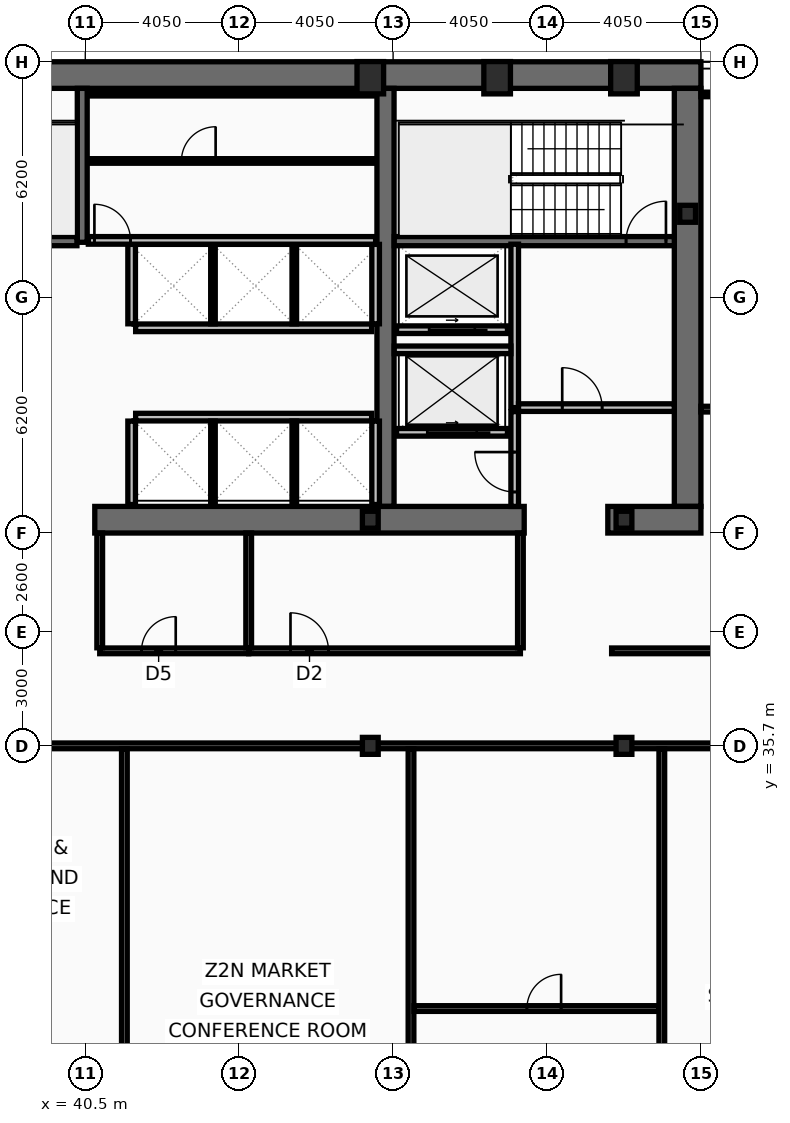
"""IFC4 building model, lengths in metres.
Left out: names, types, materials, properties, quantities, classifications, styles, units other than length and angle.
Written with IfcOpenShell. Run it as: python <this file> out.ifc"""

import sys

from ifc_helpers import new_model, si_unit, direction, frame, frame_2d, origin, origin_2d, place, context, subcontext, project, spatial, rectangle, hollow_rectangle, i_section, extrude, element, fill, save


model = new_model("IFC4")
c1 = context("Model", 3, precision=1e-05, world=origin(), true_north=direction((0.0, 1.0)))
c2 = subcontext(c1, "Body", "Model", "MODEL_VIEW")
j1 = project(units=[si_unit("LENGTHUNIT", "METRE"), si_unit("PLANEANGLEUNIT", "RADIAN")], contexts=[c1])
p1 = place(None, origin())
s1 = spatial("IfcSite", under=j1, at=p1, CompositionType="ELEMENT")
p2 = place(p1, origin())
s2 = spatial("IfcBuilding", under=s1, at=p2, CompositionType="ELEMENT")
p3 = place(p2, frame((0.0, 0.0, 114.6)))
s3 = spatial("IfcBuildingStorey", under=s2, at=p3, CompositionType="ELEMENT", Elevation=114.6)
p4 = place(p3, frame((16.2, 53.35, 0.0), z_axis=(0.0, 0.0, 1.0), x_axis=(1.0, 0.0, 0.0)))
e1 = element("IfcWall", 1, at=p4, inside=s3, PredefinedType="SHEAR", context=c2, shape_type="SweptSolid", body=[
    extrude(rectangle(XDim=40.5, YDim=0.7, at=frame_2d((20.25, 0.0))), origin(), (0.0, 0.0, 1.0), 3.44),
])
p5 = place(p3, frame((56.35, 53.0, 0.0), z_axis=(0.0, 0.0, 1.0), x_axis=(0.0, -1.0, 0.0)))
e2 = element("IfcWall", 2, at=p5, inside=s3, PredefinedType="SHEAR", context=c2, shape_type="SweptSolid", body=[
    extrude(rectangle(XDim=11.0, YDim=0.7, at=frame_2d((5.5, 0.0))), origin(), (0.0, 0.0, 1.0), 3.44),
])
p6 = place(p3, frame((48.4, 42.0, 0.0), z_axis=(0.0, 0.0, 1.0), x_axis=(0.0, 1.0, 0.0)))
e3 = element("IfcWall", 3, at=p6, inside=s3, PredefinedType="SHEAR", context=c2, shape_type="SweptSolid", body=[
    extrude(rectangle(XDim=11.0, YDim=0.45, at=frame_2d((5.5, 0.0))), origin(), (0.0, 0.0, 1.0), 3.44),
])
p7 = place(p3, frame((52.05, 41.65, 0.0), z_axis=(0.0, 0.0, 1.0), x_axis=(-1.0, 0.0, 0.0)))
e4 = element("IfcWall", 4, at=p7, inside=s3, PredefinedType="SHEAR", context=c2, shape_type="SweptSolid", body=[
    extrude(rectangle(XDim=11.3, YDim=0.7, at=frame_2d((5.65, 0.0))), origin(), (0.0, 0.0, 1.0), 3.44),
])
p8 = place(p3, frame((56.7, 41.65, 0.0), z_axis=(0.0, 0.0, 1.0), x_axis=(-1.0, 0.0, 0.0)))
e5 = element("IfcWall", 5, at=p8, inside=s3, PredefinedType="SHEAR", context=c2, shape_type="SweptSolid", body=[
    extrude(rectangle(XDim=2.45, YDim=0.7, at=frame_2d((1.225, 0.0))), origin(), (0.0, 0.0, 1.0), 3.44),
])
p9 = place(p3, frame((40.42, 48.95, 0.0), z_axis=(0.0, 0.0, 1.0), x_axis=(0.0, 1.0, 0.0)))
e6 = element("IfcWall", 6, at=p9, inside=s3, PredefinedType="SHEAR", context=c2, shape_type="SweptSolid", body=[
    extrude(rectangle(XDim=4.05, YDim=0.26, at=frame_2d((2.025, 0.0))), origin(), (0.0, 0.0, 1.0), 3.44),
])
p10 = place(p3, frame((48.63, 48.98, 0.0), z_axis=(0.0, 0.0, 1.0), x_axis=(1.0, 0.0, 0.0)))
e7 = element("IfcWall", 7, at=p10, inside=s3, PredefinedType="SHEAR", context=c2, shape_type="SweptSolid", body=[
    extrude(rectangle(XDim=7.37, YDim=0.24, at=frame_2d((3.685, 0.0))), origin(), (0.0, 0.0, 1.0), 3.44),
])
p11 = place(p10, frame((6.1, 0.0, 0.0)))
e8 = element("IfcOpeningElement", 8, at=p11, cuts=e7, PredefinedType="OPENING", context=c2, shape_type="SweptSolid", body=[
    extrude(rectangle(XDim=1.05, YDim=2.15, at=frame_2d((0.525, 1.075))), frame((0.0, 0.13, 0.0), z_axis=(0.0, -1.0, 0.0), x_axis=(1.0, 0.0, 0.0)), (0.0, 0.0, 1.0), 0.26),
])
p12 = place(p3, frame((32.72, 48.98, 0.0), z_axis=(0.0, 0.0, 1.0), x_axis=(1.0, 0.0, 0.0)))
e9 = element("IfcWall", 9, at=p12, inside=s3, PredefinedType="SHEAR", context=c2, shape_type="SweptSolid", body=[
    extrude(rectangle(XDim=7.56, YDim=0.24, at=frame_2d((3.78, 0.0))), origin(), (0.0, 0.0, 1.0), 3.44),
])
p13 = place(p12, frame((0.22, 0.0, 0.0)))
e10 = element("IfcOpeningElement", 10, at=p13, cuts=e9, PredefinedType="OPENING", context=c2, shape_type="SweptSolid", body=[
    extrude(rectangle(XDim=1.05, YDim=2.15, at=frame_2d((0.525, 1.075))), frame((0.0, 0.13, 0.0), z_axis=(0.0, -1.0, 0.0), x_axis=(1.0, 0.0, 0.0)), (0.0, 0.0, 1.0), 0.26),
])
for number, where, z_axis, x_axis in (
    (11, (48.0, 53.28, 0.0), (0.0, 0.0, 1.0), (1.0, 0.0, 0.0)),
    (12, (51.337, 53.28, 0.0), (0.0, 0.0, 1.0), (1.0, 0.0, 0.0)),
    (13, (54.675, 53.28, 0.0), (0.0, 0.0, 1.0), (1.0, 0.0, 0.0)),
):
    element("IfcColumn", number, at=place(p3, frame(where, z_axis=z_axis, x_axis=x_axis)), inside=s3, PredefinedType="COLUMN", context=c2, shape_type="SweptSolid", body=[
        extrude(hollow_rectangle(XDim=0.7, YDim=0.85, WallThickness=0.05, at=origin_2d()), origin(), (0.0, 0.0, 1.0), 3.6),
    ])
for number, where, z_axis, x_axis in (
    (14, (56.35, 49.7, 0.0), (0.0, 0.0, 1.0), (1.0, 0.0, 0.0)),
    (15, (48.0, 35.7, 0.0), (0.0, 0.0, 1.0), (1.0, 0.0, 0.0)),
    (16, (48.0, 41.65, 0.0), (0.0, 0.0, 1.0), (1.0, 0.0, 0.0)),
    (17, (54.675, 35.7, 0.0), (0.0, 0.0, 1.0), (1.0, 0.0, 0.0)),
    (18, (54.675, 41.65, 0.0), (0.0, 0.0, 1.0), (1.0, 0.0, 0.0)),
):
    element("IfcColumn", number, at=place(p3, frame(where, z_axis=z_axis, x_axis=x_axis)), inside=s3, PredefinedType="COLUMN", context=c2, shape_type="SweptSolid", body=[
        extrude(i_section(OverallWidth=0.416, OverallDepth=0.446, WebThickness=0.039, FlangeThickness=0.063, at=origin_2d()), origin(), (0.0, 0.0, 1.0), 3.6),
    ])
p14 = place(p3, frame((51.61, 43.95, 0.0), z_axis=(0.0, 0.0, 1.0), x_axis=(-1.0, 0.0, 0.0)))
e19 = element("IfcWall", 19, at=p14, inside=s3, PredefinedType="PARTITIONING", context=c2, shape_type="SweptSolid", body=[
    extrude(rectangle(XDim=2.92, YDim=0.2, at=frame_2d((1.46, 0.0))), origin(), (0.0, 0.0, 1.0), 3.44),
])
p15 = place(p14, frame((0.81, 0.0, 0.0)))
e20 = element("IfcOpeningElement", 20, at=p15, cuts=e19, PredefinedType="OPENING", context=c2, shape_type="SweptSolid", body=[
    extrude(rectangle(XDim=1.3, YDim=2.18, at=frame_2d((0.65, 1.09))), frame((0.0, 0.11, 0.0), z_axis=(0.0, -1.0, 0.0), x_axis=(1.0, 0.0, 0.0)), (0.0, 0.0, 1.0), 0.22),
])
p16 = place(p3, frame((51.61, 46.65, 0.0), z_axis=(0.0, 0.0, 1.0), x_axis=(-1.0, 0.0, 0.0)))
e21 = element("IfcWall", 21, at=p16, inside=s3, PredefinedType="PARTITIONING", context=c2, shape_type="SweptSolid", body=[
    extrude(rectangle(XDim=2.92, YDim=0.2, at=frame_2d((1.46, 0.0))), origin(), (0.0, 0.0, 1.0), 3.44),
])
p17 = place(p16, frame((0.86, 0.0, 0.0)))
e22 = element("IfcOpeningElement", 22, at=p17, cuts=e21, PredefinedType="OPENING", context=c2, shape_type="SweptSolid", body=[
    extrude(rectangle(XDim=1.2, YDim=2.18, at=frame_2d((0.6, 1.09))), frame((0.0, 0.11, 0.0), z_axis=(0.0, -1.0, 0.0), x_axis=(1.0, 0.0, 0.0)), (0.0, 0.0, 1.0), 0.22),
])
p18 = place(p3, frame((51.8, 44.6, 0.0), z_axis=(0.0, 0.0, 1.0), x_axis=(0.0, 1.0, 0.0)))
e23 = element("IfcWall", 23, at=p18, inside=s3, PredefinedType="PARTITIONING", context=c2, shape_type="SweptSolid", body=[
    extrude(rectangle(XDim=4.3, YDim=0.2, at=frame_2d((2.15, 0.0))), origin(), (0.0, 0.0, 1.0), 3.44),
])
p19 = place(p3, frame((51.9, 44.6, 0.0), z_axis=(0.0, 0.0, 1.0), x_axis=(1.0, 0.0, 0.0)))
e24 = element("IfcWall", 24, at=p19, inside=s3, PredefinedType="PARTITIONING", context=c2, shape_type="SweptSolid", body=[
    extrude(rectangle(XDim=4.1, YDim=0.2, at=frame_2d((2.05, 0.0))), origin(), (0.0, 0.0, 1.0), 3.44),
])
p20 = place(p19, frame((1.15, 0.0, 0.0)))
e25 = element("IfcOpeningElement", 25, at=p20, cuts=e24, PredefinedType="OPENING", context=c2, shape_type="SweptSolid", body=[
    extrude(rectangle(XDim=1.05, YDim=2.15, at=frame_2d((0.525, 1.075))), frame((0.0, 0.11, 0.0), z_axis=(0.0, -1.0, 0.0), x_axis=(1.0, 0.0, 0.0)), (0.0, 0.0, 1.0), 0.22),
])
p21 = place(p3, frame((48.63, 46.12, 0.0), z_axis=(0.0, 0.0, 1.0), x_axis=(1.0, 0.0, 0.0)))
e26 = element("IfcWall", 26, at=p21, inside=s3, PredefinedType="PARTITIONING", context=c2, shape_type="SweptSolid", body=[
    extrude(rectangle(XDim=3.07, YDim=0.2, at=frame_2d((1.535, 0.0))), origin(), (0.0, 0.0, 1.0), 3.44),
])
p22 = place(p3, frame((51.8, 42.0, 0.0), z_axis=(0.0, 0.0, 1.0), x_axis=(0.0, 1.0, 0.0)))
e27 = element("IfcWall", 27, at=p22, inside=s3, PredefinedType="PARTITIONING", context=c2, shape_type="SweptSolid", body=[
    extrude(rectangle(XDim=2.495, YDim=0.2, at=frame_2d((1.248, 0.0))), origin(), (0.0, 0.0, 1.0), 3.44),
])
p23 = place(p22, frame((0.38, 0.0, 0.0)))
e28 = element("IfcOpeningElement", 28, at=p23, cuts=e27, PredefinedType="OPENING", context=c2, shape_type="SweptSolid", body=[
    extrude(rectangle(XDim=1.05, YDim=2.15, at=frame_2d((0.525, 1.075))), frame((0.0, 0.11, 0.0), z_axis=(0.0, -1.0, 0.0), x_axis=(1.0, 0.0, 0.0)), (0.0, 0.0, 1.0), 0.22),
])
p24 = place(p3, frame((41.825, 46.7, 0.0), z_axis=(0.0, 0.0, 1.0), x_axis=(1.0, 0.0, 0.0)))
e29 = element("IfcWall", 29, at=p24, inside=s3, PredefinedType="PARTITIONING", context=c2, shape_type="SweptSolid", body=[
    extrude(rectangle(XDim=6.21, YDim=0.2, at=frame_2d((3.105, 0.0))), origin(), (0.0, 0.0, 1.0), 3.44),
])
for number, where, z_axis, x_axis in (
    (30, (41.72, 46.805, 0.0), (0.0, 0.0, 1.0), (0.0, 1.0, 0.0)),
    (31, (48.14, 46.805, 0.0), (0.0, 0.0, 1.0), (0.0, 1.0, 0.0)),
):
    element("IfcWall", number, at=place(p3, frame(where, z_axis=z_axis, x_axis=x_axis)), inside=s3, PredefinedType="PARTITIONING", context=c2, shape_type="SweptSolid", body=[
        extrude(rectangle(XDim=2.09, YDim=0.2, at=frame_2d((1.045, 0.0))), origin(), (0.0, 0.0, 1.0), 3.44),
    ])
for number, where, z_axis, x_axis in (
    (32, (43.86, 46.805, 0.0), (0.0, 0.0, 1.0), (0.0, 1.0, 0.0)),
    (33, (46.0, 46.805, 0.0), (0.0, 0.0, 1.0), (0.0, 1.0, 0.0)),
):
    element("IfcWall", number, at=place(p3, frame(where, z_axis=z_axis, x_axis=x_axis)), inside=s3, PredefinedType="PARTITIONING", context=c2, shape_type="SweptSolid", body=[
        extrude(rectangle(XDim=2.09, YDim=0.12, at=frame_2d((1.045, 0.0))), origin(), (0.0, 0.0, 1.0), 3.44),
    ])
p25 = place(p3, frame((41.825, 44.35, 0.0), z_axis=(0.0, 0.0, 1.0), x_axis=(1.0, 0.0, 0.0)))
e34 = element("IfcWall", 34, at=p25, inside=s3, PredefinedType="PARTITIONING", context=c2, shape_type="SweptSolid", body=[
    extrude(rectangle(XDim=6.21, YDim=0.2, at=frame_2d((3.105, 0.0))), origin(), (0.0, 0.0, 1.0), 3.44),
])
for number, where, z_axis, x_axis in (
    (35, (41.72, 42.05, 0.0), (0.0, 0.0, 1.0), (0.0, 1.0, 0.0)),
    (36, (48.14, 42.05, 0.0), (0.0, 0.0, 1.0), (0.0, 1.0, 0.0)),
):
    element("IfcWall", number, at=place(p3, frame(where, z_axis=z_axis, x_axis=x_axis)), inside=s3, PredefinedType="PARTITIONING", context=c2, shape_type="SweptSolid", body=[
        extrude(rectangle(XDim=2.195, YDim=0.2, at=frame_2d((1.098, 0.0))), origin(), (0.0, 0.0, 1.0), 3.44),
    ])
for number, where, z_axis, x_axis in (
    (37, (43.86, 42.05, 0.0), (0.0, 0.0, 1.0), (0.0, 1.0, 0.0)),
    (38, (46.0, 42.05, 0.0), (0.0, 0.0, 1.0), (0.0, 1.0, 0.0)),
):
    element("IfcWall", number, at=place(p3, frame(where, z_axis=z_axis, x_axis=x_axis)), inside=s3, PredefinedType="PARTITIONING", context=c2, shape_type="SweptSolid", body=[
        extrude(rectangle(XDim=2.195, YDim=0.12, at=frame_2d((1.098, 0.0))), origin(), (0.0, 0.0, 1.0), 3.44),
    ])
p26 = place(p3, frame((40.58, 52.86, 0.0), z_axis=(0.0, 0.0, 1.0), x_axis=(1.0, 0.0, 0.0)))
e39 = element("IfcWall", 39, at=p26, inside=s3, PredefinedType="PARTITIONING", context=c2, shape_type="SweptSolid", body=[
    extrude(rectangle(XDim=7.56, YDim=0.12, at=frame_2d((3.78, 0.0))), origin(), (0.0, 0.0, 1.0), 3.44),
])
p27 = place(p3, frame((40.58, 49.0, 0.0), z_axis=(0.0, 0.0, 1.0), x_axis=(1.0, 0.0, 0.0)))
e40 = element("IfcWall", 40, at=p27, inside=s3, PredefinedType="PARTITIONING", context=c2, shape_type="SweptSolid", body=[
    extrude(rectangle(XDim=7.56, YDim=0.2, at=frame_2d((3.78, 0.0))), origin(), (0.0, 0.0, 1.0), 3.44),
])
p28 = place(p27, frame((0.16, 0.0, 0.0)))
e41 = element("IfcOpeningElement", 41, at=p28, cuts=e40, PredefinedType="OPENING", context=c2, shape_type="SweptSolid", body=[
    extrude(rectangle(XDim=0.95, YDim=2.1, at=frame_2d((0.475, 1.05))), frame((0.0, 0.11, 0.0), z_axis=(0.0, -1.0, 0.0), x_axis=(1.0, 0.0, 0.0)), (0.0, 0.0, 1.0), 0.22),
])
p29 = place(p3, frame((40.63, 51.09, 0.0), z_axis=(0.0, 0.0, 1.0), x_axis=(1.0, 0.0, 0.0)))
e42 = element("IfcWall", 42, at=p29, inside=s3, PredefinedType="PARTITIONING", context=c2, shape_type="SweptSolid", body=[
    extrude(rectangle(XDim=7.46, YDim=0.12, at=frame_2d((3.73, 0.0))), origin(), (0.0, 0.0, 1.0), 3.44),
])
p30 = place(p29, frame((2.4, 0.0, 0.0)))
e43 = element("IfcOpeningElement", 43, at=p30, cuts=e42, PredefinedType="OPENING", context=c2, shape_type="SweptSolid", body=[
    extrude(rectangle(XDim=0.9, YDim=2.05, at=frame_2d((0.45, 1.025))), frame((0.0, 0.07, 0.0), z_axis=(0.0, -1.0, 0.0), x_axis=(1.0, 0.0, 0.0)), (0.0, 0.0, 1.0), 0.14),
])
p31 = place(p3, frame((40.88, 38.2, 0.0), z_axis=(0.0, 0.0, 1.0), x_axis=(1.0, 0.0, 0.0)))
e44 = element("IfcWall", 44, at=p31, inside=s3, PredefinedType="PARTITIONING", context=c2, shape_type="SweptSolid", body=[
    extrude(rectangle(XDim=3.92, YDim=0.15, at=frame_2d((1.96, 0.0))), origin(), (0.0, 0.0, 1.0), 2.73),
])
p32 = place(p31, frame((1.1, 0.0, 0.0)))
e45 = element("IfcOpeningElement", 45, at=p32, cuts=e44, PredefinedType="OPENING", context=c2, shape_type="SweptSolid", body=[
    extrude(rectangle(XDim=0.9, YDim=2.05, at=frame_2d((0.45, 1.025))), frame((0.0, 0.085, 0.0), z_axis=(0.0, -1.0, 0.0), x_axis=(1.0, 0.0, 0.0)), (0.0, 0.0, 1.0), 0.17),
])
p33 = place(p3, frame((44.8, 38.2, 0.0), z_axis=(0.0, 0.0, 1.0), x_axis=(1.0, 0.0, 0.0)))
e46 = element("IfcWall", 46, at=p33, inside=s3, PredefinedType="PARTITIONING", context=c2, shape_type="SweptSolid", body=[
    extrude(rectangle(XDim=7.15, YDim=0.15, at=frame_2d((3.575, 0.0))), origin(), (0.0, 0.0, 1.0), 2.73),
])
p34 = place(p33, frame((1.1, 0.0, 0.0)))
e47 = element("IfcOpeningElement", 47, at=p34, cuts=e46, PredefinedType="OPENING", context=c2, shape_type="SweptSolid", body=[
    extrude(rectangle(XDim=1.0, YDim=2.05, at=frame_2d((0.5, 1.025))), frame((0.0, 0.085, 0.0), z_axis=(0.0, -1.0, 0.0), x_axis=(1.0, 0.0, 0.0)), (0.0, 0.0, 1.0), 0.17),
])
for number, where, z_axis, x_axis in (
    (48, (40.88, 38.28, 0.0), (0.0, 0.0, 1.0), (0.0, 1.0, 0.0)),
    (49, (44.8, 38.28, 0.0), (0.0, 0.0, 1.0), (0.0, 1.0, 0.0)),
    (50, (51.95, 38.28, 0.0), (0.0, 0.0, 1.0), (0.0, 1.0, 0.0)),
):
    element("IfcWall", number, at=place(p3, frame(where, z_axis=z_axis, x_axis=x_axis)), inside=s3, PredefinedType="PARTITIONING", context=c2, shape_type="SweptSolid", body=[
        extrude(rectangle(XDim=3.02, YDim=0.15, at=frame_2d((1.51, 0.0))), origin(), (0.0, 0.0, 1.0), 3.44),
    ])
p35 = place(p3, frame((54.35, 38.2, 0.0), z_axis=(0.0, 0.0, 1.0), x_axis=(1.0, 0.0, 0.0)))
e51 = element("IfcWall", 51, at=p35, inside=s3, PredefinedType="PARTITIONING", context=c2, shape_type="SweptSolid", body=[
    extrude(rectangle(XDim=14.52, YDim=0.15, at=frame_2d((7.26, 0.0))), origin(), (0.0, 0.0, 1.0), 2.73),
])
p36 = place(p35, frame((3.25, 0.0, 0.0)))
e52 = element("IfcOpeningElement", 52, at=p36, cuts=e51, PredefinedType="OPENING", context=c2, shape_type="SweptSolid", body=[
    extrude(rectangle(XDim=0.95, YDim=2.05, at=frame_2d((0.475, 1.025))), frame((0.0, 0.085, 0.0), z_axis=(0.0, -1.0, 0.0), x_axis=(1.0, 0.0, 0.0)), (0.0, 0.0, 1.0), 0.17),
])
p37 = place(p3, frame((56.7, 44.56, 0.0), z_axis=(0.0, 0.0, 1.0), x_axis=(1.0, 0.0, 0.0)))
e53 = element("IfcWall", 53, at=p37, inside=s3, PredefinedType="PARTITIONING", context=c2, shape_type="SweptSolid", body=[
    extrude(rectangle(XDim=12.105, YDim=0.15, at=frame_2d((6.052, 0.0))), origin(), (0.0, 0.0, 1.0), 2.83),
])
p38 = place(p37, frame((0.9, 0.0, 0.0)))
e54 = element("IfcOpeningElement", 54, at=p38, cuts=e53, PredefinedType="OPENING", context=c2, shape_type="SweptSolid", body=[
    extrude(rectangle(XDim=0.9, YDim=2.05, at=frame_2d((0.45, 1.025))), frame((0.0, 0.085, 0.0), z_axis=(0.0, -1.0, 0.0), x_axis=(1.0, 0.0, 0.0)), (0.0, 0.0, 1.0), 0.17),
])
p39 = place(p3, frame((21.81, 35.7, 0.0), z_axis=(0.0, 0.0, 1.0), x_axis=(1.0, 0.0, 0.0)))
e55 = element("IfcWall", 55, at=p39, inside=s3, PredefinedType="PARTITIONING", context=c2, shape_type="SweptSolid", body=[
    extrude(rectangle(XDim=46.995, YDim=0.15, at=frame_2d((23.498, 0.0))), origin(), (0.0, 0.0, 1.0), 2.73),
])
for number, where, z_axis, x_axis in (
    (56, (41.529, 21.385, 0.0), (0.0, 0.0, 1.0), (0.0, 1.0, 0.0)),
    (57, (49.071, 21.385, 0.0), (0.0, 0.0, 1.0), (0.0, 1.0, 0.0)),
):
    element("IfcWall", number, at=place(p3, frame(where, z_axis=z_axis, x_axis=x_axis)), inside=s3, PredefinedType="PARTITIONING", context=c2, shape_type="SweptSolid", body=[
        extrude(rectangle(XDim=14.235, YDim=0.15, at=frame_2d((7.118, 0.0))), origin(), (0.0, 0.0, 1.0), 2.88),
    ])
p40 = place(p3, frame((49.151, 28.788, 0.0), z_axis=(0.0, 0.0, 1.0), x_axis=(1.0, 0.0, 0.0)))
e58 = element("IfcWall", 58, at=p40, inside=s3, PredefinedType="PARTITIONING", context=c2, shape_type="SweptSolid", body=[
    extrude(rectangle(XDim=6.44, YDim=0.15, at=frame_2d((3.22, 0.0))), origin(), (0.0, 0.0, 1.0), 2.73),
])
p41 = place(p40, frame((2.97, 0.0, 0.0)))
e59 = element("IfcOpeningElement", 59, at=p41, cuts=e58, PredefinedType="OPENING", context=c2, shape_type="SweptSolid", body=[
    extrude(rectangle(XDim=0.9, YDim=2.05, at=frame_2d((0.45, 1.025))), frame((0.0, 0.085, 0.0), z_axis=(0.0, -1.0, 0.0), x_axis=(1.0, 0.0, 0.0)), (0.0, 0.0, 1.0), 0.17),
])
p42 = place(p3, frame((55.671, 21.385, 0.0), z_axis=(0.0, 0.0, 1.0), x_axis=(0.0, 1.0, 0.0)))
e60 = element("IfcWall", 60, at=p42, inside=s3, PredefinedType="PARTITIONING", context=c2, shape_type="SweptSolid", body=[
    extrude(rectangle(XDim=14.235, YDim=0.15, at=frame_2d((7.118, 0.0))), origin(), (0.0, 0.0, 1.0), 2.73),
])
p43 = place(p3, frame((56.7, 52.84, 0.0), z_axis=(0.0, 0.0, 1.0), x_axis=(1.0, 0.0, 0.0)))
e61 = element("IfcWall", 61, at=p43, inside=s3, PredefinedType="PARTITIONING", context=c2, shape_type="SweptSolid", body=[
    extrude(rectangle(XDim=12.105, YDim=0.12, at=frame_2d((6.052, 0.0))), origin(), (0.0, 0.0, 1.0), 3.44),
])
p44 = place(p11, origin())
e62 = element("IfcDoor", 62, at=p44, inside=s3, OperationType="SINGLE_SWING_RIGHT", PredefinedType="DOOR", context=c2, shape_type="SweptSolid", body=[
    extrude(rectangle(XDim=1.05, YDim=2.15, at=frame_2d((0.525, 1.075))), frame((0.0, 0.025, 0.0), z_axis=(0.0, -1.0, 0.0), x_axis=(1.0, 0.0, 0.0)), (0.0, 0.0, 1.0), 0.05),
])
fill(e8, e62)
p45 = place(p15, origin())
e63 = element("IfcDoor", 63, at=p45, inside=s3, OperationType="SLIDING_TO_LEFT", PredefinedType="DOOR", context=c2, shape_type="SweptSolid", body=[
    extrude(rectangle(XDim=1.3, YDim=2.18, at=frame_2d((0.65, 1.09))), frame((0.0, 0.025, 0.0), z_axis=(0.0, -1.0, 0.0), x_axis=(1.0, 0.0, 0.0)), (0.0, 0.0, 1.0), 0.05),
])
fill(e20, e63)
p46 = place(p17, origin())
e64 = element("IfcDoor", 64, at=p46, inside=s3, OperationType="SLIDING_TO_LEFT", PredefinedType="DOOR", context=c2, shape_type="SweptSolid", body=[
    extrude(rectangle(XDim=1.2, YDim=2.18, at=frame_2d((0.6, 1.09))), frame((0.0, 0.025, 0.0), z_axis=(0.0, -1.0, 0.0), x_axis=(1.0, 0.0, 0.0)), (0.0, 0.0, 1.0), 0.05),
])
fill(e22, e64)
p47 = place(p20, origin())
e65 = element("IfcDoor", 65, at=p47, inside=s3, OperationType="SINGLE_SWING_LEFT", PredefinedType="DOOR", context=c2, shape_type="SweptSolid", body=[
    extrude(rectangle(XDim=1.05, YDim=2.15, at=frame_2d((0.525, 1.075))), frame((0.0, 0.025, 0.0), z_axis=(0.0, -1.0, 0.0), x_axis=(1.0, 0.0, 0.0)), (0.0, 0.0, 1.0), 0.05),
])
fill(e25, e65)
p48 = place(p23, origin())
e66 = element("IfcDoor", 66, at=p48, inside=s3, OperationType="SINGLE_SWING_RIGHT", PredefinedType="DOOR", context=c2, shape_type="SweptSolid", body=[
    extrude(rectangle(XDim=1.05, YDim=2.15, at=frame_2d((0.525, 1.075))), frame((0.0, 0.025, 0.0), z_axis=(0.0, -1.0, 0.0), x_axis=(1.0, 0.0, 0.0)), (0.0, 0.0, 1.0), 0.05),
])
fill(e28, e66)
p49 = place(p28, origin())
e67 = element("IfcDoor", 67, at=p49, inside=s3, OperationType="SINGLE_SWING_LEFT", PredefinedType="DOOR", context=c2, shape_type="SweptSolid", body=[
    extrude(rectangle(XDim=0.95, YDim=2.1, at=frame_2d((0.475, 1.05))), frame((0.0, 0.025, 0.0), z_axis=(0.0, -1.0, 0.0), x_axis=(1.0, 0.0, 0.0)), (0.0, 0.0, 1.0), 0.05),
])
fill(e41, e67)
p50 = place(p30, origin())
e68 = element("IfcDoor", 68, at=p50, inside=s3, OperationType="SINGLE_SWING_RIGHT", PredefinedType="DOOR", context=c2, shape_type="SweptSolid", body=[
    extrude(rectangle(XDim=0.9, YDim=2.05, at=frame_2d((0.45, 1.025))), frame((0.0, 0.025, 0.0), z_axis=(0.0, -1.0, 0.0), x_axis=(1.0, 0.0, 0.0)), (0.0, 0.0, 1.0), 0.05),
])
fill(e43, e68)
p51 = place(p32, origin())
e69 = element("IfcDoor", 69, at=p51, inside=s3, OperationType="SINGLE_SWING_RIGHT", PredefinedType="DOOR", context=c2, shape_type="SweptSolid", body=[
    extrude(rectangle(XDim=0.9, YDim=2.05, at=frame_2d((0.45, 1.025))), frame((0.0, 0.025, 0.0), z_axis=(0.0, -1.0, 0.0), x_axis=(1.0, 0.0, 0.0)), (0.0, 0.0, 1.0), 0.05),
])
fill(e45, e69)
p52 = place(p34, origin())
e70 = element("IfcDoor", 70, at=p52, inside=s3, OperationType="SINGLE_SWING_LEFT", PredefinedType="DOOR", context=c2, shape_type="SweptSolid", body=[
    extrude(rectangle(XDim=1.0, YDim=2.05, at=frame_2d((0.5, 1.025))), frame((0.0, 0.025, 0.0), z_axis=(0.0, -1.0, 0.0), x_axis=(1.0, 0.0, 0.0)), (0.0, 0.0, 1.0), 0.05),
])
fill(e47, e70)
p53 = place(p41, origin())
e71 = element("IfcDoor", 71, at=p53, inside=s3, OperationType="SINGLE_SWING_RIGHT", PredefinedType="DOOR", context=c2, shape_type="SweptSolid", body=[
    extrude(rectangle(XDim=0.9, YDim=2.05, at=frame_2d((0.45, 1.025))), frame((0.0, 0.025, 0.0), z_axis=(0.0, -1.0, 0.0), x_axis=(1.0, 0.0, 0.0)), (0.0, 0.0, 1.0), 0.05),
])
fill(e59, e71)
save(model, sys.argv[1])
